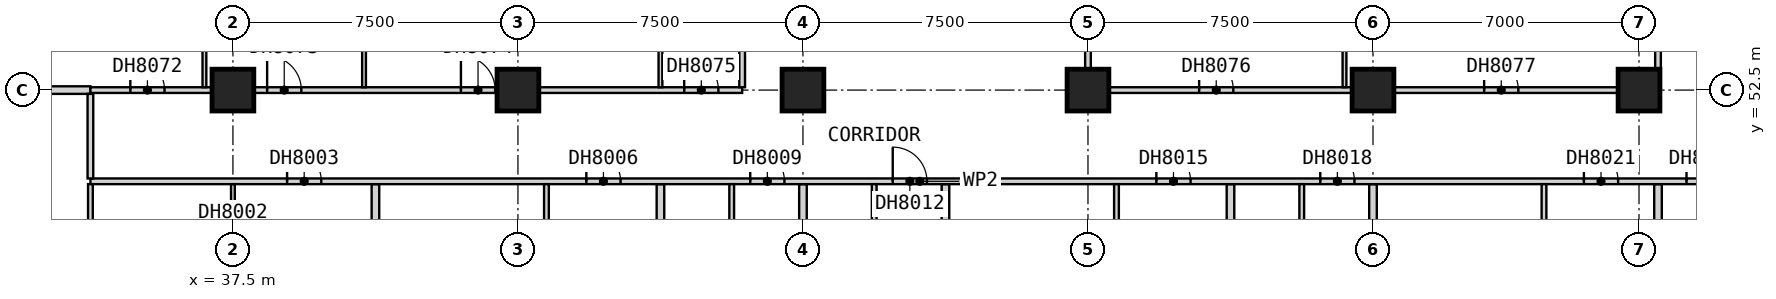
"""IFC4 building model, lengths in metres.
Left out: names, types, materials, properties, quantities, classifications, styles, units other than length and angle.
Written with IfcOpenShell. Run it as: python <this file> out.ifc"""

import sys

from ifc_helpers import new_model, si_unit, direction, frame, frame_2d, origin, origin_2d, place, context, subcontext, project, spatial, rectangle, extrude, element, fill, save


model = new_model("IFC4")
c1 = context("Model", 3, precision=1e-05, world=origin(), true_north=direction((0.0, 1.0)))
c2 = subcontext(c1, "Body", "Model", "MODEL_VIEW")
j1 = project(units=[si_unit("LENGTHUNIT", "METRE"), si_unit("PLANEANGLEUNIT", "RADIAN")], contexts=[c1])
p1 = place(None, origin())
s1 = spatial("IfcSite", under=j1, at=p1, CompositionType="ELEMENT")
p2 = place(p1, origin())
s2 = spatial("IfcBuilding", under=s1, at=p2, CompositionType="ELEMENT")
p3 = place(p2, frame((0.0, 0.0, 89.9)))
s3 = spatial("IfcBuildingStorey", under=s2, at=p3, CompositionType="ELEMENT", Elevation=89.9)
for number, where, z_axis, x_axis in (
    (1, (37.5, 52.5, 0.0), (0.0, 0.0, 1.0), (1.0, 0.0, 0.0)),
    (2, (45.0, 52.5, 0.0), (0.0, 0.0, 1.0), (1.0, 0.0, 0.0)),
    (3, (52.5, 52.5, 0.0), (0.0, 0.0, 1.0), (1.0, 0.0, 0.0)),
    (4, (60.0, 52.5, 0.0), (0.0, 0.0, 1.0), (1.0, 0.0, 0.0)),
    (5, (67.5, 52.5, 0.0), (0.0, 0.0, 1.0), (1.0, 0.0, 0.0)),
    (6, (74.5, 52.5, 0.0), (0.0, 0.0, 1.0), (1.0, 0.0, 0.0)),
):
    element("IfcColumn", number, at=place(p3, frame(where, z_axis=z_axis, x_axis=x_axis)), inside=s3, PredefinedType="COLUMN", context=c2, shape_type="SweptSolid", body=[
        extrude(rectangle(XDim=1.1, YDim=1.1, at=origin_2d()), origin(), (0.0, 0.0, 1.0), 3.6),
    ])
p4 = place(p3, frame((30.0, 52.5, 0.0), z_axis=(0.0, 0.0, 1.0), x_axis=(1.0, 0.0, 0.0)))
e7 = element("IfcWall", 7, at=p4, inside=s3, PredefinedType="PARTITIONING", context=c2, shape_type="SweptSolid", body=[
    extrude(rectangle(XDim=3.75, YDim=0.2, at=frame_2d((1.875, 0.0))), origin(), (0.0, 0.0, 1.0), 3.35),
])
for number, where, z_axis, x_axis in (
    (8, (41.25, 38.31, 0.0), (0.0, 0.0, 1.0), (0.0, 1.0, 0.0)),
    (9, (48.75, 38.31, 0.0), (0.0, 0.0, 1.0), (0.0, 1.0, 0.0)),
):
    element("IfcWall", number, at=place(p3, frame(where, z_axis=z_axis, x_axis=x_axis)), inside=s3, PredefinedType="PARTITIONING", context=c2, shape_type="SweptSolid", body=[
        extrude(rectangle(XDim=11.715, YDim=0.2, at=frame_2d((5.857, 0.0))), origin(), (0.0, 0.0, 1.0), 3.35),
    ])
p5 = place(p3, frame((52.5, 37.5, 0.0), z_axis=(0.0, 0.0, 1.0), x_axis=(0.0, 1.0, 0.0)))
e10 = element("IfcWall", 10, at=p5, inside=s3, PredefinedType="PARTITIONING", context=c2, shape_type="SweptSolid", body=[
    extrude(rectangle(XDim=12.525, YDim=0.2, at=frame_2d((6.262, 0.0))), origin(), (0.0, 0.0, 1.0), 3.35),
])
for number, where, z_axis, x_axis in (
    (11, (56.25, 38.31, 0.0), (0.0, 0.0, 1.0), (0.0, 1.0, 0.0)),
    (12, (63.75, 38.31, 0.0), (0.0, 0.0, 1.0), (0.0, 1.0, 0.0)),
):
    element("IfcWall", number, at=place(p3, frame(where, z_axis=z_axis, x_axis=x_axis)), inside=s3, PredefinedType="PARTITIONING", context=c2, shape_type="SweptSolid", body=[
        extrude(rectangle(XDim=11.715, YDim=0.2, at=frame_2d((5.857, 0.0))), origin(), (0.0, 0.0, 1.0), 3.35),
    ])
p6 = place(p3, frame((67.5, 37.5, 0.0), z_axis=(0.0, 0.0, 1.0), x_axis=(0.0, 1.0, 0.0)))
e13 = element("IfcWall", 13, at=p6, inside=s3, PredefinedType="PARTITIONING", context=c2, shape_type="SweptSolid", body=[
    extrude(rectangle(XDim=12.525, YDim=0.2, at=frame_2d((6.262, 0.0))), origin(), (0.0, 0.0, 1.0), 3.35),
])
p7 = place(p3, frame((75.0, 38.31, 0.0), z_axis=(0.0, 0.0, 1.0), x_axis=(0.0, 1.0, 0.0)))
e14 = element("IfcWall", 14, at=p7, inside=s3, PredefinedType="PARTITIONING", context=c2, shape_type="SweptSolid", body=[
    extrude(rectangle(XDim=11.715, YDim=0.2, at=frame_2d((5.857, 0.0))), origin(), (0.0, 0.0, 1.0), 3.35),
])
p8 = place(p3, frame((33.75, 50.1, 0.0), z_axis=(0.0, 0.0, 1.0), x_axis=(1.0, 0.0, 0.0)))
e15 = element("IfcWall", 15, at=p8, inside=s3, PredefinedType="PARTITIONING", context=c2, shape_type="SweptSolid", body=[
    extrude(rectangle(XDim=43.65, YDim=0.15, at=frame_2d((21.825, 0.0))), origin(), (0.0, 0.0, 1.0), 3.35),
])
p9 = place(p8, frame((5.175, 0.0, 0.0)))
e16 = element("IfcOpeningElement", 16, at=p9, cuts=e15, PredefinedType="OPENING", context=c2, shape_type="SweptSolid", body=[
    extrude(rectangle(XDim=0.9, YDim=2.1, at=frame_2d((0.45, 1.05))), frame((0.0, 0.085, 0.0), z_axis=(0.0, -1.0, 0.0), x_axis=(1.0, 0.0, 0.0)), (0.0, 0.0, 1.0), 0.17),
])
p10 = place(p8, frame((13.05, 0.0, 0.0)))
e17 = element("IfcOpeningElement", 17, at=p10, cuts=e15, PredefinedType="OPENING", context=c2, shape_type="SweptSolid", body=[
    extrude(rectangle(XDim=0.9, YDim=2.1, at=frame_2d((0.45, 1.05))), frame((0.0, 0.085, 0.0), z_axis=(0.0, -1.0, 0.0), x_axis=(1.0, 0.0, 0.0)), (0.0, 0.0, 1.0), 0.17),
])
p11 = place(p8, frame((17.363, 0.0, 0.0)))
e18 = element("IfcOpeningElement", 18, at=p11, cuts=e15, PredefinedType="OPENING", context=c2, shape_type="SweptSolid", body=[
    extrude(rectangle(XDim=0.9, YDim=2.1, at=frame_2d((0.45, 1.05))), frame((0.0, 0.085, 0.0), z_axis=(0.0, -1.0, 0.0), x_axis=(1.0, 0.0, 0.0)), (0.0, 0.0, 1.0), 0.17),
])
p12 = place(p8, frame((21.113, 0.0, 0.0)))
e19 = element("IfcOpeningElement", 19, at=p12, cuts=e15, PredefinedType="OPENING", context=c2, shape_type="SweptSolid", body=[
    extrude(rectangle(XDim=0.9, YDim=2.1, at=frame_2d((0.45, 1.05))), frame((0.0, 0.085, 0.0), z_axis=(0.0, -1.0, 0.0), x_axis=(1.0, 0.0, 0.0)), (0.0, 0.0, 1.0), 0.17),
])
p13 = place(p8, frame((28.05, 0.0, 0.0)))
e20 = element("IfcOpeningElement", 20, at=p13, cuts=e15, PredefinedType="OPENING", context=c2, shape_type="SweptSolid", body=[
    extrude(rectangle(XDim=0.9, YDim=2.1, at=frame_2d((0.45, 1.05))), frame((0.0, 0.085, 0.0), z_axis=(0.0, -1.0, 0.0), x_axis=(1.0, 0.0, 0.0)), (0.0, 0.0, 1.0), 0.17),
])
p14 = place(p8, frame((32.363, 0.0, 0.0)))
e21 = element("IfcOpeningElement", 21, at=p14, cuts=e15, PredefinedType="OPENING", context=c2, shape_type="SweptSolid", body=[
    extrude(rectangle(XDim=0.9, YDim=2.1, at=frame_2d((0.45, 1.05))), frame((0.0, 0.085, 0.0), z_axis=(0.0, -1.0, 0.0), x_axis=(1.0, 0.0, 0.0)), (0.0, 0.0, 1.0), 0.17),
])
p15 = place(p8, frame((39.3, 0.0, 0.0)))
e22 = element("IfcOpeningElement", 22, at=p15, cuts=e15, PredefinedType="OPENING", context=c2, shape_type="SweptSolid", body=[
    extrude(rectangle(XDim=0.9, YDim=2.1, at=frame_2d((0.45, 1.05))), frame((0.0, 0.085, 0.0), z_axis=(0.0, -1.0, 0.0), x_axis=(1.0, 0.0, 0.0)), (0.0, 0.0, 1.0), 0.17),
])
p16 = place(p8, frame((42.0, 0.0, 0.0)))
e23 = element("IfcOpeningElement", 23, at=p16, cuts=e15, PredefinedType="OPENING", context=c2, shape_type="SweptSolid", body=[
    extrude(rectangle(XDim=0.9, YDim=2.1, at=frame_2d((0.45, 1.05))), frame((0.0, 0.085, 0.0), z_axis=(0.0, -1.0, 0.0), x_axis=(1.0, 0.0, 0.0)), (0.0, 0.0, 1.0), 0.17),
])
p17 = place(p3, frame((33.75, 52.5, 0.0), z_axis=(0.0, 0.0, 1.0), x_axis=(1.0, 0.0, 0.0)))
e24 = element("IfcWall", 24, at=p17, inside=s3, PredefinedType="PARTITIONING", context=c2, shape_type="SweptSolid", body=[
    extrude(rectangle(XDim=17.15, YDim=0.15, at=frame_2d((8.575, 0.0))), origin(), (0.0, 0.0, 1.0), 3.35),
])
p18 = place(p17, frame((1.05, 0.0, 0.0)))
e25 = element("IfcOpeningElement", 25, at=p18, cuts=e24, PredefinedType="OPENING", context=c2, shape_type="SweptSolid", body=[
    extrude(rectangle(XDim=0.9, YDim=2.1, at=frame_2d((0.45, 1.05))), frame((0.0, 0.085, 0.0), z_axis=(0.0, -1.0, 0.0), x_axis=(1.0, 0.0, 0.0)), (0.0, 0.0, 1.0), 0.17),
])
p19 = place(p17, frame((4.65, 0.0, 0.0)))
e26 = element("IfcOpeningElement", 26, at=p19, cuts=e24, PredefinedType="OPENING", context=c2, shape_type="SweptSolid", body=[
    extrude(rectangle(XDim=0.9, YDim=2.1, at=frame_2d((0.45, 1.05))), frame((0.0, 0.085, 0.0), z_axis=(0.0, -1.0, 0.0), x_axis=(1.0, 0.0, 0.0)), (0.0, 0.0, 1.0), 0.17),
])
p20 = place(p17, frame((9.75, 0.0, 0.0)))
e27 = element("IfcOpeningElement", 27, at=p20, cuts=e24, PredefinedType="OPENING", context=c2, shape_type="SweptSolid", body=[
    extrude(rectangle(XDim=0.9, YDim=2.1, at=frame_2d((0.45, 1.05))), frame((0.0, 0.085, 0.0), z_axis=(0.0, -1.0, 0.0), x_axis=(1.0, 0.0, 0.0)), (0.0, 0.0, 1.0), 0.17),
])
p21 = place(p17, frame((15.625, 0.0, 0.0)))
e28 = element("IfcOpeningElement", 28, at=p21, cuts=e24, PredefinedType="OPENING", context=c2, shape_type="SweptSolid", body=[
    extrude(rectangle(XDim=0.9, YDim=2.1, at=frame_2d((0.45, 1.05))), frame((0.0, 0.085, 0.0), z_axis=(0.0, -1.0, 0.0), x_axis=(1.0, 0.0, 0.0)), (0.0, 0.0, 1.0), 0.17),
])
p22 = place(p3, frame((60.0, 52.5, 0.0), z_axis=(0.0, 0.0, 1.0), x_axis=(1.0, 0.0, 0.0)))
e29 = element("IfcWall", 29, at=p22, inside=s3, PredefinedType="PARTITIONING", context=c2, shape_type="SweptSolid", body=[
    extrude(rectangle(XDim=15.0, YDim=0.15, at=frame_2d((7.5, 0.0))), origin(), (0.0, 0.0, 1.0), 3.35),
])
p23 = place(p22, frame((2.925, 0.0, 0.0)))
e30 = element("IfcOpeningElement", 30, at=p23, cuts=e29, PredefinedType="OPENING", context=c2, shape_type="SweptSolid", body=[
    extrude(rectangle(XDim=0.9, YDim=2.1, at=frame_2d((0.45, 1.05))), frame((0.0, 0.085, 0.0), z_axis=(0.0, -1.0, 0.0), x_axis=(1.0, 0.0, 0.0)), (0.0, 0.0, 1.0), 0.17),
])
p24 = place(p22, frame((10.425, 0.0, 0.0)))
e31 = element("IfcOpeningElement", 31, at=p24, cuts=e29, PredefinedType="OPENING", context=c2, shape_type="SweptSolid", body=[
    extrude(rectangle(XDim=0.9, YDim=2.1, at=frame_2d((0.45, 1.05))), frame((0.0, 0.085, 0.0), z_axis=(0.0, -1.0, 0.0), x_axis=(1.0, 0.0, 0.0)), (0.0, 0.0, 1.0), 0.17),
])
p25 = place(p3, frame((33.75, 50.175, 0.0), z_axis=(0.0, 0.0, 1.0), x_axis=(0.0, 1.0, 0.0)))
e32 = element("IfcWall", 32, at=p25, inside=s3, PredefinedType="PARTITIONING", context=c2, shape_type="SweptSolid", body=[
    extrude(rectangle(XDim=2.225, YDim=0.15, at=frame_2d((1.112, 0.0))), origin(), (0.0, 0.0, 1.0), 3.35),
])
p26 = place(p3, frame((75.0, 52.575, 0.0), z_axis=(0.0, 0.0, 1.0), x_axis=(0.0, 1.0, 0.0)))
e33 = element("IfcWall", 33, at=p26, inside=s3, PredefinedType="PARTITIONING", context=c2, shape_type="SweptSolid", body=[
    extrude(rectangle(XDim=11.85, YDim=0.15, at=frame_2d((5.925, 0.0))), origin(), (0.0, 0.0, 1.0), 3.35),
])
p27 = place(p26, frame((9.225, 0.0, 0.0)))
e34 = element("IfcOpeningElement", 34, at=p27, cuts=e33, PredefinedType="OPENING", context=c2, shape_type="SweptSolid", body=[
    extrude(rectangle(XDim=0.9, YDim=2.1, at=frame_2d((0.45, 1.05))), frame((0.0, 0.085, 0.0), z_axis=(0.0, -1.0, 0.0), x_axis=(1.0, 0.0, 0.0)), (0.0, 0.0, 1.0), 0.17),
])
p28 = place(p3, frame((36.75, 52.575, 0.0), z_axis=(0.0, 0.0, 1.0), x_axis=(0.0, 1.0, 0.0)))
e35 = element("IfcWall", 35, at=p28, inside=s3, PredefinedType="PARTITIONING", context=c2, shape_type="SweptSolid", body=[
    extrude(rectangle(XDim=7.425, YDim=0.1, at=frame_2d((3.712, 0.0))), origin(), (0.0, 0.0, 1.0), 3.35),
])
p29 = place(p3, frame((37.5, 45.3, 0.0), z_axis=(0.0, 0.0, 1.0), x_axis=(0.0, 1.0, 0.0)))
e36 = element("IfcWall", 36, at=p29, inside=s3, PredefinedType="PARTITIONING", context=c2, shape_type="SweptSolid", body=[
    extrude(rectangle(XDim=4.725, YDim=0.1, at=frame_2d((2.362, 0.0))), origin(), (0.0, 0.0, 1.0), 3.35),
])
p30 = place(p29, frame((1.925, 0.0, 0.0)))
e37 = element("IfcOpeningElement", 37, at=p30, cuts=e36, PredefinedType="OPENING", context=c2, shape_type="SweptSolid", body=[
    extrude(rectangle(XDim=0.9, YDim=2.1, at=frame_2d((0.45, 1.05))), frame((0.0, 0.06, 0.0), z_axis=(0.0, -1.0, 0.0), x_axis=(1.0, 0.0, 0.0)), (0.0, 0.0, 1.0), 0.12),
])
for number, where, z_axis, x_axis in (
    (38, (40.95, 52.575, 0.0), (0.0, 0.0, 1.0), (0.0, 1.0, 0.0)),
    (39, (48.75, 52.575, 0.0), (0.0, 0.0, 1.0), (0.0, 1.0, 0.0)),
):
    element("IfcWall", number, at=place(p3, frame(where, z_axis=z_axis, x_axis=x_axis)), inside=s3, PredefinedType="PARTITIONING", context=c2, shape_type="SweptSolid", body=[
        extrude(rectangle(XDim=7.425, YDim=0.1, at=frame_2d((3.712, 0.0))), origin(), (0.0, 0.0, 1.0), 3.35),
    ])
p31 = place(p3, frame((66.75, 52.575, 0.0), z_axis=(0.0, 0.0, 1.0), x_axis=(0.0, 1.0, 0.0)))
e40 = element("IfcWall", 40, at=p31, inside=s3, PredefinedType="PARTITIONING", context=c2, shape_type="SweptSolid", body=[
    extrude(rectangle(XDim=7.375, YDim=0.1, at=frame_2d((3.688, 0.0))), origin(), (0.0, 0.0, 1.0), 3.35),
])
for number, where, z_axis, x_axis in (
    (41, (33.75, 45.312, 0.0), (0.0, 0.0, 1.0), (0.0, 1.0, 0.0)),
    (42, (45.75, 45.312, 0.0), (0.0, 0.0, 1.0), (0.0, 1.0, 0.0)),
    (43, (50.625, 45.312, 0.0), (0.0, 0.0, 1.0), (0.0, 1.0, 0.0)),
    (44, (54.375, 45.312, 0.0), (0.0, 0.0, 1.0), (0.0, 1.0, 0.0)),
    (45, (60.75, 45.312, 0.0), (0.0, 0.0, 1.0), (0.0, 1.0, 0.0)),
    (46, (65.625, 45.312, 0.0), (0.0, 0.0, 1.0), (0.0, 1.0, 0.0)),
    (47, (72.0, 45.312, 0.0), (0.0, 0.0, 1.0), (0.0, 1.0, 0.0)),
):
    element("IfcWall", number, at=place(p3, frame(where, z_axis=z_axis, x_axis=x_axis)), inside=s3, PredefinedType="PARTITIONING", context=c2, shape_type="SweptSolid", body=[
        extrude(rectangle(XDim=4.712, YDim=0.125, at=frame_2d((2.356, 0.0))), origin(), (0.0, 0.0, 1.0), 3.35),
    ])
for number, where, z_axis, x_axis in (
    (48, (50.9, 52.575, 0.0), (0.0, 0.0, 1.0), (0.0, 1.0, 0.0)),
    (49, (60.0, 52.575, 0.0), (0.0, 0.0, 1.0), (0.0, 1.0, 0.0)),
):
    element("IfcWall", number, at=place(p3, frame(where, z_axis=z_axis, x_axis=x_axis)), inside=s3, PredefinedType="PARTITIONING", context=c2, shape_type="SweptSolid", body=[
        extrude(rectangle(XDim=7.425, YDim=0.15, at=frame_2d((3.712, 0.0))), origin(), (0.0, 0.0, 1.0), 3.35),
    ])
p32 = place(p9, origin())
e50 = element("IfcDoor", 50, at=p32, inside=s3, OperationType="SINGLE_SWING_RIGHT", PredefinedType="DOOR", context=c2, shape_type="SweptSolid", body=[
    extrude(rectangle(XDim=0.9, YDim=2.1, at=frame_2d((0.45, 1.05))), frame((0.0, 0.025, 0.0), z_axis=(0.0, -1.0, 0.0), x_axis=(1.0, 0.0, 0.0)), (0.0, 0.0, 1.0), 0.05),
])
fill(e16, e50)
p33 = place(p10, origin())
e51 = element("IfcDoor", 51, at=p33, inside=s3, OperationType="SINGLE_SWING_RIGHT", PredefinedType="DOOR", context=c2, shape_type="SweptSolid", body=[
    extrude(rectangle(XDim=0.9, YDim=2.1, at=frame_2d((0.45, 1.05))), frame((0.0, 0.025, 0.0), z_axis=(0.0, -1.0, 0.0), x_axis=(1.0, 0.0, 0.0)), (0.0, 0.0, 1.0), 0.05),
])
fill(e17, e51)
p34 = place(p11, origin())
e52 = element("IfcDoor", 52, at=p34, inside=s3, OperationType="SINGLE_SWING_RIGHT", PredefinedType="DOOR", context=c2, shape_type="SweptSolid", body=[
    extrude(rectangle(XDim=0.9, YDim=2.1, at=frame_2d((0.45, 1.05))), frame((0.0, 0.025, 0.0), z_axis=(0.0, -1.0, 0.0), x_axis=(1.0, 0.0, 0.0)), (0.0, 0.0, 1.0), 0.05),
])
fill(e18, e52)
p35 = place(p12, origin())
e53 = element("IfcDoor", 53, at=p35, inside=s3, OperationType="SINGLE_SWING_RIGHT", PredefinedType="DOOR", context=c2, shape_type="SweptSolid", body=[
    extrude(rectangle(XDim=0.9, YDim=2.1, at=frame_2d((0.45, 1.05))), frame((0.0, 0.025, 0.0), z_axis=(0.0, -1.0, 0.0), x_axis=(1.0, 0.0, 0.0)), (0.0, 0.0, 1.0), 0.05),
])
fill(e19, e53)
p36 = place(p13, origin())
e54 = element("IfcDoor", 54, at=p36, inside=s3, OperationType="SINGLE_SWING_RIGHT", PredefinedType="DOOR", context=c2, shape_type="SweptSolid", body=[
    extrude(rectangle(XDim=0.9, YDim=2.1, at=frame_2d((0.45, 1.05))), frame((0.0, 0.025, 0.0), z_axis=(0.0, -1.0, 0.0), x_axis=(1.0, 0.0, 0.0)), (0.0, 0.0, 1.0), 0.05),
])
fill(e20, e54)
p37 = place(p14, origin())
e55 = element("IfcDoor", 55, at=p37, inside=s3, OperationType="SINGLE_SWING_RIGHT", PredefinedType="DOOR", context=c2, shape_type="SweptSolid", body=[
    extrude(rectangle(XDim=0.9, YDim=2.1, at=frame_2d((0.45, 1.05))), frame((0.0, 0.025, 0.0), z_axis=(0.0, -1.0, 0.0), x_axis=(1.0, 0.0, 0.0)), (0.0, 0.0, 1.0), 0.05),
])
fill(e21, e55)
p38 = place(p15, origin())
e56 = element("IfcDoor", 56, at=p38, inside=s3, OperationType="SINGLE_SWING_RIGHT", PredefinedType="DOOR", context=c2, shape_type="SweptSolid", body=[
    extrude(rectangle(XDim=0.9, YDim=2.1, at=frame_2d((0.45, 1.05))), frame((0.0, 0.025, 0.0), z_axis=(0.0, -1.0, 0.0), x_axis=(1.0, 0.0, 0.0)), (0.0, 0.0, 1.0), 0.05),
])
fill(e22, e56)
p39 = place(p16, origin())
e57 = element("IfcDoor", 57, at=p39, inside=s3, OperationType="SINGLE_SWING_LEFT", PredefinedType="DOOR", context=c2, shape_type="SweptSolid", body=[
    extrude(rectangle(XDim=0.9, YDim=2.1, at=frame_2d((0.45, 1.05))), frame((0.0, 0.025, 0.0), z_axis=(0.0, -1.0, 0.0), x_axis=(1.0, 0.0, 0.0)), (0.0, 0.0, 1.0), 0.05),
])
fill(e23, e57)
p40 = place(p18, origin())
e58 = element("IfcDoor", 58, at=p40, inside=s3, OperationType="SINGLE_SWING_LEFT", PredefinedType="DOOR", context=c2, shape_type="SweptSolid", body=[
    extrude(rectangle(XDim=0.9, YDim=2.1, at=frame_2d((0.45, 1.05))), frame((0.0, 0.025, 0.0), z_axis=(0.0, -1.0, 0.0), x_axis=(1.0, 0.0, 0.0)), (0.0, 0.0, 1.0), 0.05),
])
fill(e25, e58)
p41 = place(p19, origin())
e59 = element("IfcDoor", 59, at=p41, inside=s3, OperationType="SINGLE_SWING_LEFT", PredefinedType="DOOR", context=c2, shape_type="SweptSolid", body=[
    extrude(rectangle(XDim=0.9, YDim=2.1, at=frame_2d((0.45, 1.05))), frame((0.0, 0.025, 0.0), z_axis=(0.0, -1.0, 0.0), x_axis=(1.0, 0.0, 0.0)), (0.0, 0.0, 1.0), 0.05),
])
fill(e26, e59)
p42 = place(p20, origin())
e60 = element("IfcDoor", 60, at=p42, inside=s3, OperationType="SINGLE_SWING_LEFT", PredefinedType="DOOR", context=c2, shape_type="SweptSolid", body=[
    extrude(rectangle(XDim=0.9, YDim=2.1, at=frame_2d((0.45, 1.05))), frame((0.0, 0.025, 0.0), z_axis=(0.0, -1.0, 0.0), x_axis=(1.0, 0.0, 0.0)), (0.0, 0.0, 1.0), 0.05),
])
fill(e27, e60)
p43 = place(p21, origin())
e61 = element("IfcDoor", 61, at=p43, inside=s3, OperationType="SINGLE_SWING_LEFT", PredefinedType="DOOR", context=c2, shape_type="SweptSolid", body=[
    extrude(rectangle(XDim=0.9, YDim=2.1, at=frame_2d((0.45, 1.05))), frame((0.0, 0.025, 0.0), z_axis=(0.0, -1.0, 0.0), x_axis=(1.0, 0.0, 0.0)), (0.0, 0.0, 1.0), 0.05),
])
fill(e28, e61)
p44 = place(p23, origin())
e62 = element("IfcDoor", 62, at=p44, inside=s3, OperationType="SINGLE_SWING_LEFT", PredefinedType="DOOR", context=c2, shape_type="SweptSolid", body=[
    extrude(rectangle(XDim=0.9, YDim=2.1, at=frame_2d((0.45, 1.05))), frame((0.0, 0.025, 0.0), z_axis=(0.0, -1.0, 0.0), x_axis=(1.0, 0.0, 0.0)), (0.0, 0.0, 1.0), 0.05),
])
fill(e30, e62)
p45 = place(p24, origin())
e63 = element("IfcDoor", 63, at=p45, inside=s3, OperationType="SINGLE_SWING_LEFT", PredefinedType="DOOR", context=c2, shape_type="SweptSolid", body=[
    extrude(rectangle(XDim=0.9, YDim=2.1, at=frame_2d((0.45, 1.05))), frame((0.0, 0.025, 0.0), z_axis=(0.0, -1.0, 0.0), x_axis=(1.0, 0.0, 0.0)), (0.0, 0.0, 1.0), 0.05),
])
fill(e31, e63)
save(model, sys.argv[1])
